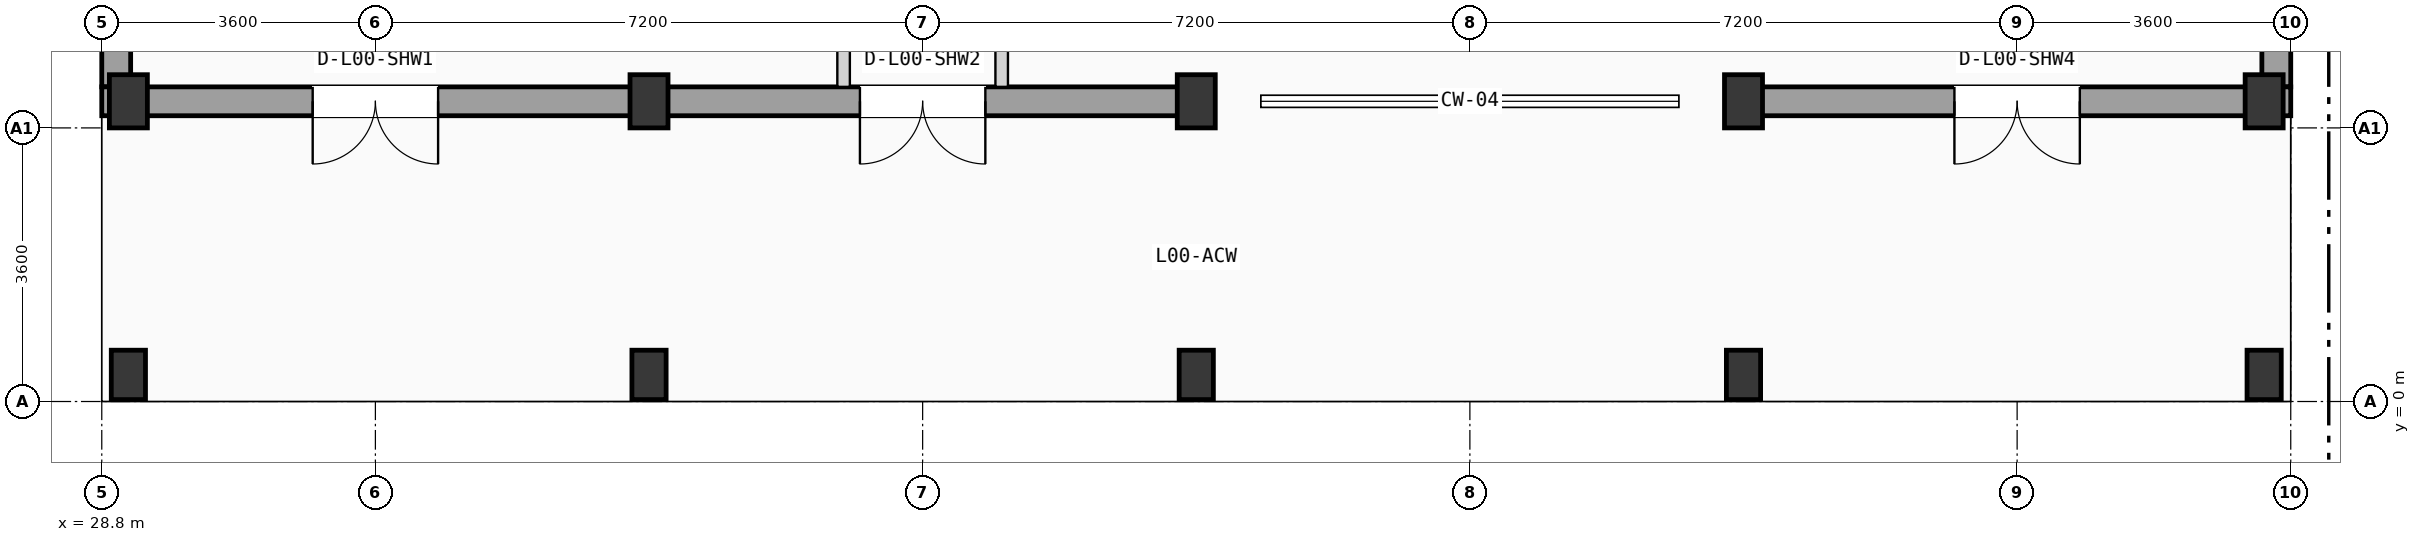
"""IFC4 building model, lengths in metres.
Left out: names, types, materials, properties, quantities, classifications, styles, units other than length and angle.
Written with IfcOpenShell. Run it as: python <this file> out.ifc"""

import sys

from ifc_helpers import new_model, si_unit, direction, frame, frame_2d, origin, origin_2d, place, context, subcontext, project, spatial, rectangle, extrude, element, fill, save


model = new_model("IFC4")
c1 = context("Model", 3, precision=1e-05, world=origin(), true_north=direction((0.0, 1.0)))
c2 = subcontext(c1, "Body", "Model", "MODEL_VIEW")
j1 = project(units=[si_unit("LENGTHUNIT", "METRE"), si_unit("PLANEANGLEUNIT", "RADIAN")], contexts=[c1])
p1 = place(None, origin())
s1 = spatial("IfcSite", under=j1, at=p1, CompositionType="ELEMENT")
p2 = place(p1, origin())
s2 = spatial("IfcBuilding", under=s1, at=p2, CompositionType="ELEMENT")
p3 = place(p2, origin())
s3 = spatial("IfcBuildingStorey", under=s2, at=p3, CompositionType="ELEMENT", Elevation=0.0)
p4 = place(p3, frame((29.15, 0.35, 0.0), z_axis=(0.0, 0.0, 1.0), x_axis=(1.0, 0.0, 0.0)))
e1 = element("IfcColumn", 1, at=p4, inside=s3, PredefinedType="PILASTER", context=c2, shape_type="SweptSolid", body=[
    extrude(rectangle(XDim=0.45, YDim=0.65, at=origin_2d()), origin(), (0.0, 0.0, 1.0), 4.9),
])
p5 = place(p3, frame((29.15, 3.95, 0.0), z_axis=(0.0, 0.0, 1.0), x_axis=(1.0, 0.0, 0.0)))
e2 = element("IfcColumn", 2, at=p5, inside=s3, PredefinedType="COLUMN", context=c2, shape_type="SweptSolid", body=[
    extrude(rectangle(XDim=0.5, YDim=0.7, at=origin_2d()), origin(), (0.0, 0.0, 1.0), 4.9),
])
p6 = place(p3, frame((36.0, 0.35, 0.0), z_axis=(0.0, 0.0, 1.0), x_axis=(1.0, 0.0, 0.0)))
e3 = element("IfcColumn", 3, at=p6, inside=s3, PredefinedType="PILASTER", context=c2, shape_type="SweptSolid", body=[
    extrude(rectangle(XDim=0.45, YDim=0.65, at=origin_2d()), origin(), (0.0, 0.0, 1.0), 4.9),
])
p7 = place(p3, frame((36.0, 3.95, 0.0), z_axis=(0.0, 0.0, 1.0), x_axis=(1.0, 0.0, 0.0)))
e4 = element("IfcColumn", 4, at=p7, inside=s3, PredefinedType="COLUMN", context=c2, shape_type="SweptSolid", body=[
    extrude(rectangle(XDim=0.5, YDim=0.7, at=origin_2d()), origin(), (0.0, 0.0, 1.0), 4.9),
])
p8 = place(p3, frame((43.2, 0.35, 0.0), z_axis=(0.0, 0.0, 1.0), x_axis=(1.0, 0.0, 0.0)))
e5 = element("IfcColumn", 5, at=p8, inside=s3, PredefinedType="PILASTER", context=c2, shape_type="SweptSolid", body=[
    extrude(rectangle(XDim=0.45, YDim=0.65, at=origin_2d()), origin(), (0.0, 0.0, 1.0), 4.9),
])
p9 = place(p3, frame((43.2, 3.95, 0.0), z_axis=(0.0, 0.0, 1.0), x_axis=(1.0, 0.0, 0.0)))
e6 = element("IfcColumn", 6, at=p9, inside=s3, PredefinedType="COLUMN", context=c2, shape_type="SweptSolid", body=[
    extrude(rectangle(XDim=0.5, YDim=0.7, at=origin_2d()), origin(), (0.0, 0.0, 1.0), 4.9),
])
p10 = place(p3, frame((50.4, 0.35, 0.0), z_axis=(0.0, 0.0, 1.0), x_axis=(1.0, 0.0, 0.0)))
e7 = element("IfcColumn", 7, at=p10, inside=s3, PredefinedType="PILASTER", context=c2, shape_type="SweptSolid", body=[
    extrude(rectangle(XDim=0.45, YDim=0.65, at=origin_2d()), origin(), (0.0, 0.0, 1.0), 4.9),
])
p11 = place(p3, frame((50.4, 3.95, 0.0), z_axis=(0.0, 0.0, 1.0), x_axis=(1.0, 0.0, 0.0)))
e8 = element("IfcColumn", 8, at=p11, inside=s3, PredefinedType="COLUMN", context=c2, shape_type="SweptSolid", body=[
    extrude(rectangle(XDim=0.5, YDim=0.7, at=origin_2d()), origin(), (0.0, 0.0, 1.0), 4.9),
])
p12 = place(p3, frame((57.25, 0.35, 0.0), z_axis=(0.0, 0.0, 1.0), x_axis=(1.0, 0.0, 0.0)))
e9 = element("IfcColumn", 9, at=p12, inside=s3, PredefinedType="PILASTER", context=c2, shape_type="SweptSolid", body=[
    extrude(rectangle(XDim=0.45, YDim=0.65, at=origin_2d()), origin(), (0.0, 0.0, 1.0), 4.9),
])
p13 = place(p3, frame((57.25, 3.95, 0.0), z_axis=(0.0, 0.0, 1.0), x_axis=(1.0, 0.0, 0.0)))
e10 = element("IfcColumn", 10, at=p13, inside=s3, PredefinedType="COLUMN", context=c2, shape_type="SweptSolid", body=[
    extrude(rectangle(XDim=0.5, YDim=0.7, at=origin_2d()), origin(), (0.0, 0.0, 1.0), 4.9),
])
for number, where, z_axis, x_axis in (
    (11, (28.99, 4.14, 0.0), (0.0, 0.0, 1.0), (0.0, 1.0, 0.0)),
    (12, (57.41, 4.14, 0.0), (0.0, 0.0, 1.0), (0.0, 1.0, 0.0)),
):
    element("IfcWall", number, at=place(p3, frame(where, z_axis=z_axis, x_axis=x_axis)), inside=s3, PredefinedType="SOLIDWALL", context=c2, shape_type="SweptSolid", body=[
        extrude(rectangle(XDim=17.08, YDim=0.38, at=frame_2d((8.54, 0.0))), origin(), (0.0, 0.0, 1.0), 4.625),
    ])
p14 = place(p3, frame((28.8, 3.95, 0.0), z_axis=(0.0, 0.0, 1.0), x_axis=(1.0, 0.0, 0.0)))
e13 = element("IfcWall", 13, at=p14, inside=s3, PredefinedType="SOLIDWALL", context=c2, shape_type="SweptSolid", body=[
    extrude(rectangle(XDim=7.2, YDim=0.38, at=frame_2d((3.6, 0.0))), origin(), (0.0, 0.0, 1.0), 4.625),
])
p15 = place(p14, frame((2.775, 0.0, 0.0)))
e14 = element("IfcOpeningElement", 14, at=p15, cuts=e13, PredefinedType="OPENING", context=c2, shape_type="SweptSolid", body=[
    extrude(rectangle(XDim=1.65, YDim=2.3, at=frame_2d((0.825, 1.15))), frame((0.0, 0.2, 0.0), z_axis=(0.0, -1.0, 0.0), x_axis=(1.0, 0.0, 0.0)), (0.0, 0.0, 1.0), 0.4),
])
p16 = place(p3, frame((36.0, 3.95, 0.0), z_axis=(0.0, 0.0, 1.0), x_axis=(1.0, 0.0, 0.0)))
e15 = element("IfcWall", 15, at=p16, inside=s3, PredefinedType="SOLIDWALL", context=c2, shape_type="SweptSolid", body=[
    extrude(rectangle(XDim=7.2, YDim=0.38, at=frame_2d((3.6, 0.0))), origin(), (0.0, 0.0, 1.0), 4.625),
])
p17 = place(p16, frame((2.775, 0.0, 0.0)))
e16 = element("IfcOpeningElement", 16, at=p17, cuts=e15, PredefinedType="OPENING", context=c2, shape_type="SweptSolid", body=[
    extrude(rectangle(XDim=1.65, YDim=2.3, at=frame_2d((0.825, 1.15))), frame((0.0, 0.2, 0.0), z_axis=(0.0, -1.0, 0.0), x_axis=(1.0, 0.0, 0.0)), (0.0, 0.0, 1.0), 0.4),
])
p18 = place(p3, frame((50.4, 3.95, 0.0), z_axis=(0.0, 0.0, 1.0), x_axis=(1.0, 0.0, 0.0)))
e17 = element("IfcWall", 17, at=p18, inside=s3, PredefinedType="SOLIDWALL", context=c2, shape_type="SweptSolid", body=[
    extrude(rectangle(XDim=7.2, YDim=0.38, at=frame_2d((3.6, 0.0))), origin(), (0.0, 0.0, 1.0), 4.625),
])
p19 = place(p18, frame((2.775, 0.0, 0.0)))
e18 = element("IfcOpeningElement", 18, at=p19, cuts=e17, PredefinedType="OPENING", context=c2, shape_type="SweptSolid", body=[
    extrude(rectangle(XDim=1.65, YDim=2.3, at=frame_2d((0.825, 1.15))), frame((0.0, 0.2, 0.0), z_axis=(0.0, -1.0, 0.0), x_axis=(1.0, 0.0, 0.0)), (0.0, 0.0, 1.0), 0.4),
])
p20 = place(p3, frame((38.56, 4.14, 0.0), z_axis=(0.0, 0.0, 1.0), x_axis=(0.0, 1.0, 0.0)))
e19 = element("IfcWall", 19, at=p20, inside=s3, PredefinedType="PARTITIONING", context=c2, shape_type="SweptSolid", body=[
    extrude(rectangle(XDim=8.028, YDim=0.165, at=frame_2d((4.014, 0.0))), origin(), (0.0, 0.0, 1.0), 3.84),
])
p21 = place(p20, frame((3.5, 0.0, 0.0)))
e20 = element("IfcOpeningElement", 20, at=p21, cuts=e19, PredefinedType="OPENING", context=c2, shape_type="SweptSolid", body=[
    extrude(rectangle(XDim=1.02, YDim=2.16, at=frame_2d((0.51, 1.08))), frame((0.0, 0.093, 0.0), z_axis=(0.0, -1.0, 0.0), x_axis=(1.0, 0.0, 0.0)), (0.0, 0.0, 1.0), 0.185),
])
p22 = place(p3, frame((40.64, 4.14, 0.0), z_axis=(0.0, 0.0, 1.0), x_axis=(0.0, 1.0, 0.0)))
e21 = element("IfcWall", 21, at=p22, inside=s3, PredefinedType="PARTITIONING", context=c2, shape_type="SweptSolid", body=[
    extrude(rectangle(XDim=8.028, YDim=0.165, at=frame_2d((4.014, 0.0))), origin(), (0.0, 0.0, 1.0), 3.84),
])
p23 = place(p22, frame((3.5, 0.0, 0.0)))
e22 = element("IfcOpeningElement", 22, at=p23, cuts=e21, PredefinedType="OPENING", context=c2, shape_type="SweptSolid", body=[
    extrude(rectangle(XDim=1.02, YDim=2.16, at=frame_2d((0.51, 1.08))), frame((0.0, 0.093, 0.0), z_axis=(0.0, -1.0, 0.0), x_axis=(1.0, 0.0, 0.0)), (0.0, 0.0, 1.0), 0.185),
])
p24 = place(p15, frame((1.65, 0.0, 0.0), z_axis=(0.0, 0.0, 1.0), x_axis=(-1.0, 0.0, 0.0)))
e23 = element("IfcDoor", 23, at=p24, inside=s3, OperationType="DOUBLE_DOOR_SINGLE_SWING", PredefinedType="DOOR", context=c2, shape_type="SweptSolid", body=[
    extrude(rectangle(XDim=1.65, YDim=2.3, at=frame_2d((0.825, 1.15))), frame((0.0, 0.025, 0.0), z_axis=(0.0, -1.0, 0.0), x_axis=(1.0, 0.0, 0.0)), (0.0, 0.0, 1.0), 0.05),
])
fill(e14, e23)
p25 = place(p17, frame((1.65, 0.0, 0.0), z_axis=(0.0, 0.0, 1.0), x_axis=(-1.0, 0.0, 0.0)))
e24 = element("IfcDoor", 24, at=p25, inside=s3, OperationType="DOUBLE_DOOR_SINGLE_SWING", PredefinedType="DOOR", context=c2, shape_type="SweptSolid", body=[
    extrude(rectangle(XDim=1.65, YDim=2.3, at=frame_2d((0.825, 1.15))), frame((0.0, 0.025, 0.0), z_axis=(0.0, -1.0, 0.0), x_axis=(1.0, 0.0, 0.0)), (0.0, 0.0, 1.0), 0.05),
])
fill(e16, e24)
p26 = place(p19, frame((1.65, 0.0, 0.0), z_axis=(0.0, 0.0, 1.0), x_axis=(-1.0, 0.0, 0.0)))
e25 = element("IfcDoor", 25, at=p26, inside=s3, OperationType="DOUBLE_DOOR_SINGLE_SWING", PredefinedType="DOOR", context=c2, shape_type="SweptSolid", body=[
    extrude(rectangle(XDim=1.65, YDim=2.3, at=frame_2d((0.825, 1.15))), frame((0.0, 0.025, 0.0), z_axis=(0.0, -1.0, 0.0), x_axis=(1.0, 0.0, 0.0)), (0.0, 0.0, 1.0), 0.05),
])
fill(e18, e25)
save(model, sys.argv[1])
